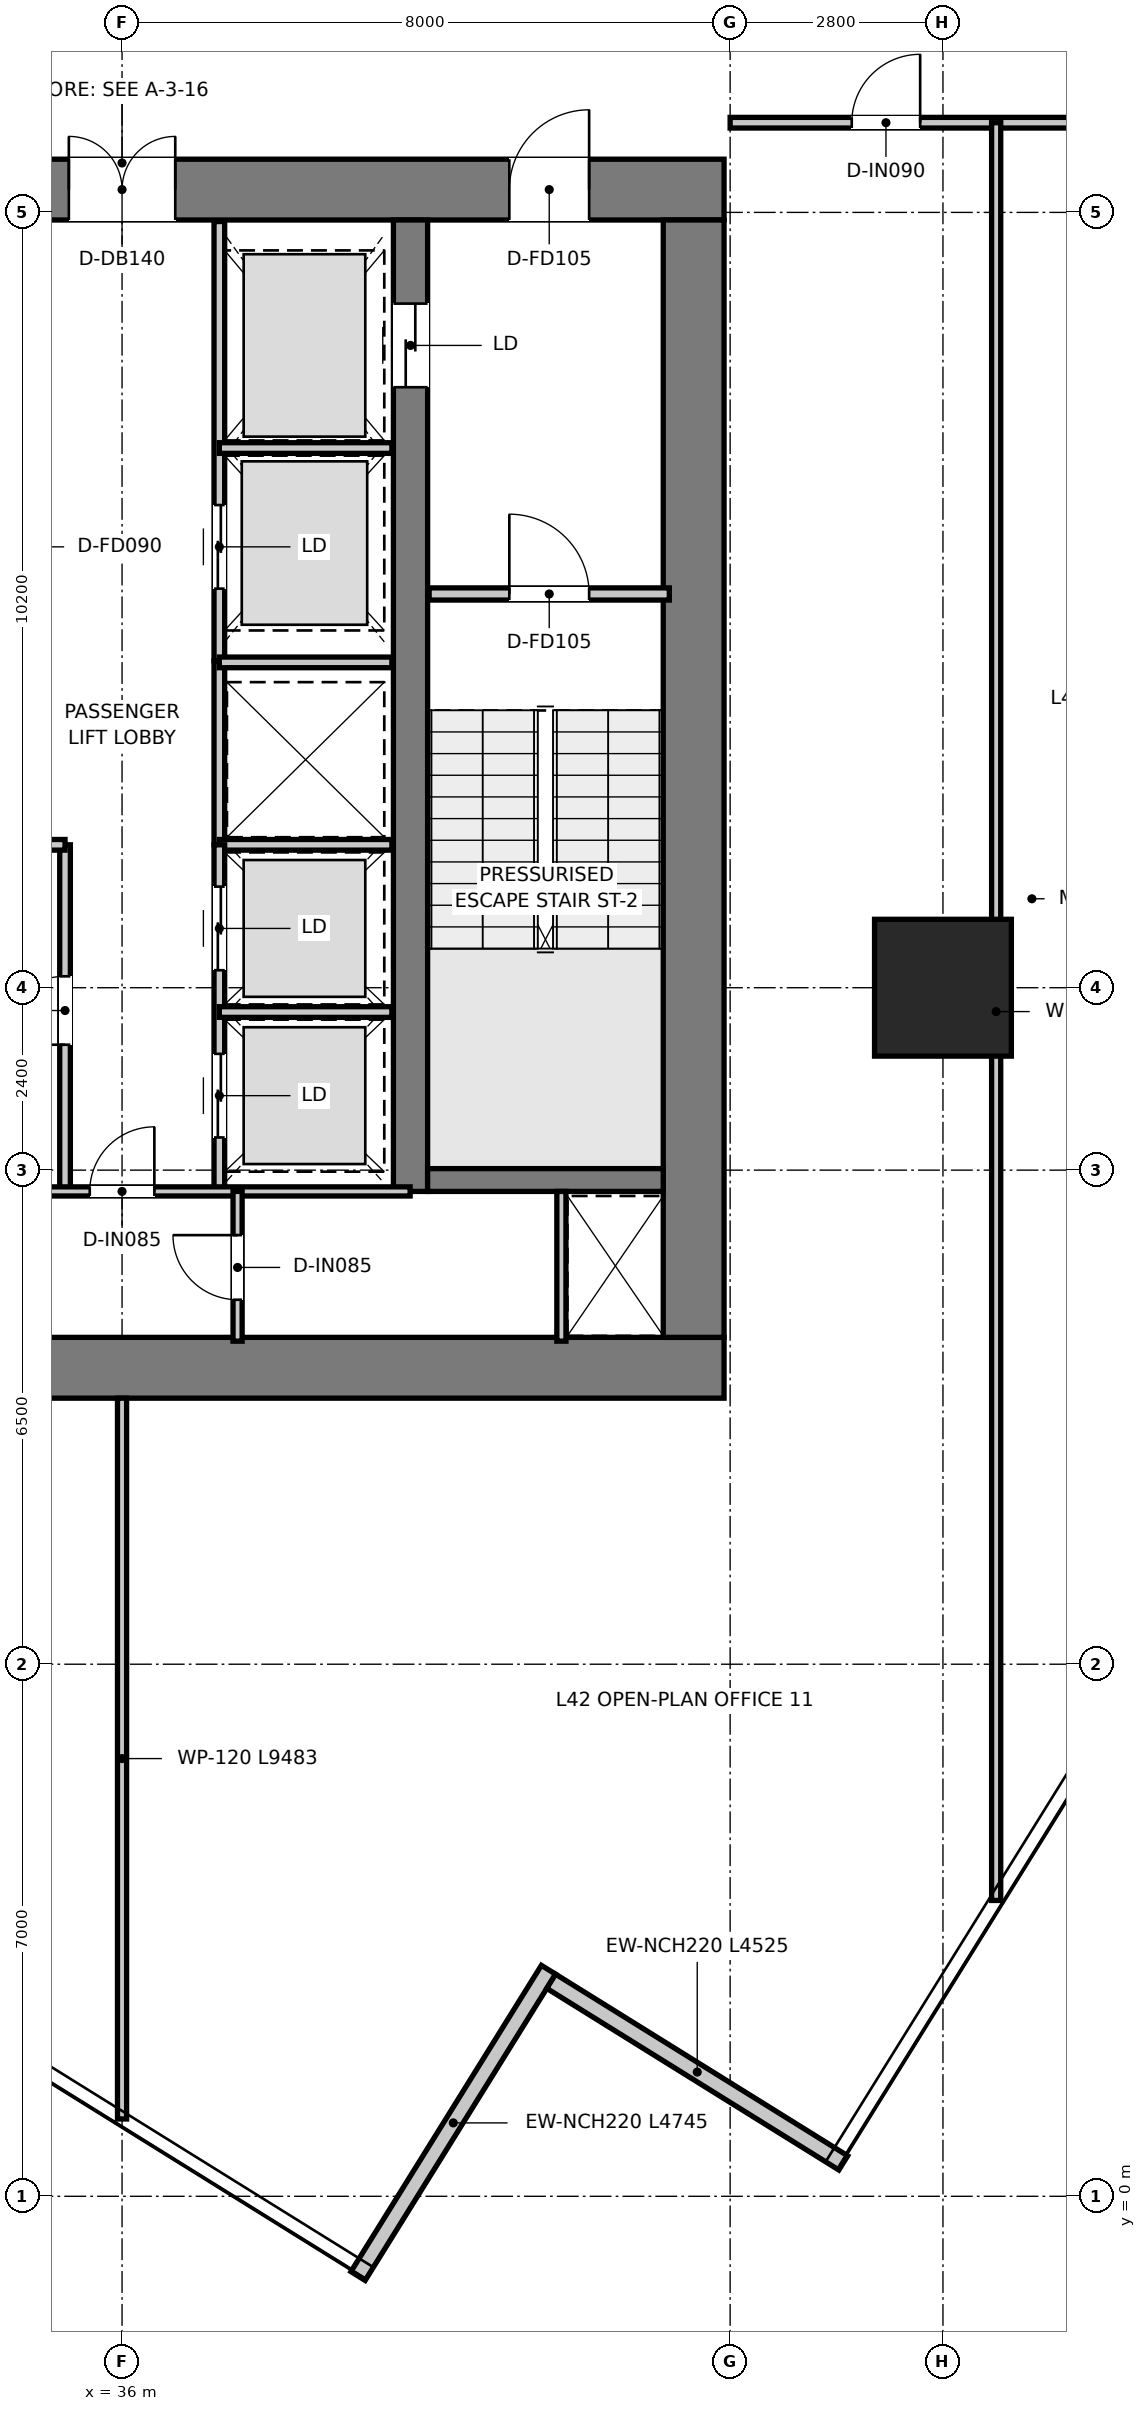
"""IFC4 building model, lengths in metres.
Left out: names, types, materials, properties, quantities, classifications, styles, units other than length and angle.
Written with IfcOpenShell. Run it as: python <this file> out.ifc"""

import sys

from ifc_helpers import new_model, si_unit, direction, frame, frame_2d, origin, origin_2d, place, context, subcontext, project, spatial, rectangle, extrude, source, transform, mapped, element, fill, save


model = new_model("IFC4")
c1 = context("Model", 3, precision=1e-05, world=origin(), true_north=direction((0.0, 1.0)))
c2 = subcontext(c1, "Body", "Model", "MODEL_VIEW")
j1 = project(units=[si_unit("LENGTHUNIT", "METRE"), si_unit("PLANEANGLEUNIT", "RADIAN")], contexts=[c1])
p1 = place(None, origin())
s1 = spatial("IfcSite", under=j1, at=p1, CompositionType="ELEMENT")
p2 = place(p1, origin())
s2 = spatial("IfcBuilding", under=s1, at=p2, CompositionType="ELEMENT")
p3 = place(p2, frame((0.0, 0.0, 173.85)))
s3 = spatial("IfcBuildingStorey", under=s2, at=p3, CompositionType="ELEMENT", Elevation=173.85)
p4 = place(p3, frame((28.08, 10.9, 0.0), z_axis=(0.0, 0.0, 1.0), x_axis=(1.0, 0.0, 0.0)))
e1 = element("IfcWall", 1, at=p4, inside=s3, PredefinedType="SHEAR", context=c2, shape_type="SweptSolid", body=[
    extrude(rectangle(XDim=15.84, YDim=0.8, at=frame_2d((7.92, 0.0))), origin(), (0.0, 0.0, 1.0), 3.95),
])
p5 = place(p3, frame((28.08, 26.4, 0.0), z_axis=(0.0, 0.0, 1.0), x_axis=(1.0, 0.0, 0.0)))
e2 = element("IfcWall", 2, at=p5, inside=s3, PredefinedType="SHEAR", context=c2, shape_type="SweptSolid", body=[
    extrude(rectangle(XDim=15.84, YDim=0.8, at=frame_2d((7.92, 0.0))), origin(), (0.0, 0.0, 1.0), 3.95),
])
p6 = place(p5, frame((7.22, 0.0, 0.0)))
e3 = element("IfcOpeningElement", 3, at=p6, cuts=e2, PredefinedType="OPENING", context=c2, shape_type="SweptSolid", body=[
    extrude(rectangle(XDim=1.4, YDim=2.2, at=frame_2d((0.7, 1.1))), frame((0.0, 0.41, 0.0), z_axis=(0.0, -1.0, 0.0), x_axis=(1.0, 0.0, 0.0)), (0.0, 0.0, 1.0), 0.82),
])
p7 = place(p5, frame((1.775, 0.0, 0.0)))
e4 = element("IfcOpeningElement", 4, at=p7, cuts=e2, PredefinedType="OPENING", context=c2, shape_type="SweptSolid", body=[
    extrude(rectangle(XDim=1.05, YDim=2.1, at=frame_2d((0.525, 1.05))), frame((0.0, 0.41, 0.0), z_axis=(0.0, -1.0, 0.0), x_axis=(1.0, 0.0, 0.0)), (0.0, 0.0, 1.0), 0.82),
])
p8 = place(p5, frame((13.015, 0.0, 0.0)))
e5 = element("IfcOpeningElement", 5, at=p8, cuts=e2, PredefinedType="OPENING", context=c2, shape_type="SweptSolid", body=[
    extrude(rectangle(XDim=1.05, YDim=2.1, at=frame_2d((0.525, 1.05))), frame((0.0, 0.41, 0.0), z_axis=(0.0, -1.0, 0.0), x_axis=(1.0, 0.0, 0.0)), (0.0, 0.0, 1.0), 0.82),
])
p9 = place(p3, frame((43.52, 11.3, 0.0), z_axis=(0.0, 0.0, 1.0), x_axis=(0.0, 1.0, 0.0)))
e6 = element("IfcWall", 6, at=p9, inside=s3, PredefinedType="SHEAR", context=c2, shape_type="SweptSolid", body=[
    extrude(rectangle(XDim=14.7, YDim=0.8, at=frame_2d((7.35, 0.0))), origin(), (0.0, 0.0, 1.0), 3.95),
])
p10 = place(p3, frame((39.795, 13.22, 0.0), z_axis=(0.0, 0.0, 1.0), x_axis=(0.0, 1.0, 0.0)))
e7 = element("IfcWall", 7, at=p10, inside=s3, PredefinedType="SHEAR", context=c2, shape_type="SweptSolid", body=[
    extrude(rectangle(XDim=12.78, YDim=0.45, at=frame_2d((6.39, 0.0))), origin(), (0.0, 0.0, 1.0), 3.95),
])
p11 = place(p10, frame((10.58, 0.0, 0.0)))
e8 = element("IfcOpeningElement", 8, at=p11, cuts=e7, PredefinedType="OPENING", context=c2, shape_type="SweptSolid", body=[
    extrude(rectangle(XDim=1.1, YDim=2.15, at=frame_2d((0.55, 1.075))), frame((0.0, 0.235, 0.0), z_axis=(0.0, -1.0, 0.0), x_axis=(1.0, 0.0, 0.0)), (0.0, 0.0, 1.0), 0.47),
])
p12 = place(p3, frame((40.02, 13.37, 0.0), z_axis=(0.0, 0.0, 1.0), x_axis=(1.0, 0.0, 0.0)))
e9 = element("IfcWall", 9, at=p12, inside=s3, PredefinedType="SHEAR", context=c2, shape_type="SweptSolid", body=[
    extrude(rectangle(XDim=3.1, YDim=0.3, at=frame_2d((1.55, 0.0))), origin(), (0.0, 0.0, 1.0), 3.95),
])
m1 = source(origin(), c2, "Body", "SweptSolid", [
    extrude(rectangle(XDim=1.8, YDim=1.8, at=origin_2d()), origin(), (0.0, 0.0, 1.0), 3.95),
])
p13 = place(p3, frame((46.8, 15.9, 0.0), z_axis=(0.0, 0.0, 1.0), x_axis=(1.0, 0.0, 0.0)))
e10 = element("IfcColumn", 10, at=p13, inside=s3, PredefinedType="USERDEFINED", context=c2, shape_type="MappedRepresentation", body=[
    mapped(m1, transform((0.0, 0.0, 0.0), x_axis=(1.0, 0.0, 0.0), y_axis=(0.0, 1.0, 0.0), z_axis=(0.0, 0.0, 1.0), scale=1.0)),
])
p14 = place(p3, frame((39.105, -1.049, 0.0), z_axis=(0.0, 0.0, 1.0), x_axis=(0.528087569346, 0.849189919336, 0.0)))
e11 = element("IfcWall", 11, at=p14, inside=s3, PredefinedType="ELEMENTEDWALL", context=c2, shape_type="SweptSolid", body=[
    extrude(rectangle(XDim=4.745, YDim=0.22, at=frame_2d((2.373, 0.0))), origin(), (0.0, 0.0, 1.0), 3.67),
])
p15 = place(p3, frame((41.646, 2.829, 0.0), z_axis=(0.0, 0.0, 1.0), x_axis=(0.849220592333, -0.528038242514, 0.0)))
e12 = element("IfcWall", 12, at=p15, inside=s3, PredefinedType="ELEMENTEDWALL", context=c2, shape_type="SweptSolid", body=[
    extrude(rectangle(XDim=4.525, YDim=0.22, at=frame_2d((2.263, 0.0))), origin(), (0.0, 0.0, 1.0), 3.67),
])
p16 = place(p3, frame((40.04, 21.08, 0.0), z_axis=(0.0, 0.0, 1.0), x_axis=(1.0, 0.0, 0.0)))
e13 = element("IfcWall", 13, at=p16, inside=s3, PredefinedType="PARTITIONING", context=c2, shape_type="SweptSolid", body=[
    extrude(rectangle(XDim=3.16, YDim=0.16, at=frame_2d((1.58, 0.0))), origin(), (0.0, 0.0, 1.0), 3.67),
])
p17 = place(p16, frame((1.055, 0.0, 0.0)))
e14 = element("IfcOpeningElement", 14, at=p17, cuts=e13, PredefinedType="OPENING", context=c2, shape_type="SweptSolid", body=[
    extrude(rectangle(XDim=1.05, YDim=2.1, at=frame_2d((0.525, 1.05))), frame((0.0, 0.09, 0.0), z_axis=(0.0, -1.0, 0.0), x_axis=(1.0, 0.0, 0.0)), (0.0, 0.0, 1.0), 0.18),
])
p18 = place(p3, frame((37.28, 20.2, 0.0), z_axis=(0.0, 0.0, 1.0), x_axis=(0.0, 1.0, 0.0)))
e15 = element("IfcWall", 15, at=p18, inside=s3, PredefinedType="PARTITIONING", context=c2, shape_type="SweptSolid", body=[
    extrude(rectangle(XDim=5.78, YDim=0.14, at=frame_2d((2.89, 0.0))), origin(), (0.0, 0.0, 1.0), 2.67),
])
p19 = place(p18, frame((0.95, 0.0, 0.0)))
e16 = element("IfcOpeningElement", 16, at=p19, cuts=e15, PredefinedType="OPENING", context=c2, shape_type="SweptSolid", body=[
    extrude(rectangle(XDim=1.1, YDim=2.15, at=frame_2d((0.55, 1.075))), frame((0.0, 0.08, 0.0), z_axis=(0.0, -1.0, 0.0), x_axis=(1.0, 0.0, 0.0)), (0.0, 0.0, 1.0), 0.16),
])
p20 = place(p3, frame((37.28, 23.0, 0.0), z_axis=(0.0, 0.0, 1.0), x_axis=(1.0, 0.0, 0.0)))
e17 = element("IfcWall", 17, at=p20, inside=s3, PredefinedType="PARTITIONING", context=c2, shape_type="SweptSolid", body=[
    extrude(rectangle(XDim=2.27, YDim=0.14, at=frame_2d((1.135, 0.0))), origin(), (0.0, 0.0, 1.0), 2.67),
])
p21 = place(p3, frame((37.28, 17.78, 0.0), z_axis=(0.0, 0.0, 1.0), x_axis=(0.0, 1.0, 0.0)))
e18 = element("IfcWall", 18, at=p21, inside=s3, PredefinedType="PARTITIONING", context=c2, shape_type="SweptSolid", body=[
    extrude(rectangle(XDim=2.42, YDim=0.14, at=frame_2d((1.21, 0.0))), origin(), (0.0, 0.0, 1.0), 3.67),
])
for number, where, z_axis, x_axis in (
    (19, (37.28, 17.78, 0.0), (0.0, 0.0, 1.0), (1.0, 0.0, 0.0)),
    (20, (37.28, 20.18, 0.0), (0.0, 0.0, 1.0), (1.0, 0.0, 0.0)),
):
    element("IfcWall", number, at=place(p3, frame(where, z_axis=z_axis, x_axis=x_axis)), inside=s3, PredefinedType="PARTITIONING", context=c2, shape_type="SweptSolid", body=[
        extrude(rectangle(XDim=2.27, YDim=0.14, at=frame_2d((1.135, 0.0))), origin(), (0.0, 0.0, 1.0), 3.67),
    ])
p22 = place(p3, frame((35.25, 13.22, 0.0), z_axis=(0.0, 0.0, 1.0), x_axis=(0.0, 1.0, 0.0)))
e21 = element("IfcWall", 21, at=p22, inside=s3, PredefinedType="PARTITIONING", context=c2, shape_type="SweptSolid", body=[
    extrude(rectangle(XDim=4.56, YDim=0.14, at=frame_2d((2.28, 0.0))), origin(), (0.0, 0.0, 1.0), 3.67),
])
p23 = place(p22, frame((1.93, 0.0, 0.0)))
e22 = element("IfcOpeningElement", 22, at=p23, cuts=e21, PredefinedType="OPENING", context=c2, shape_type="SweptSolid", body=[
    extrude(rectangle(XDim=0.9, YDim=2.1, at=frame_2d((0.45, 1.05))), frame((0.0, 0.08, 0.0), z_axis=(0.0, -1.0, 0.0), x_axis=(1.0, 0.0, 0.0)), (0.0, 0.0, 1.0), 0.16),
])
p24 = place(p3, frame((34.72, 17.78, 0.0), z_axis=(0.0, 0.0, 1.0), x_axis=(1.0, 0.0, 0.0)))
e23 = element("IfcWall", 23, at=p24, inside=s3, PredefinedType="PARTITIONING", context=c2, shape_type="SweptSolid", body=[
    extrude(rectangle(XDim=0.53, YDim=0.14, at=frame_2d((0.265, 0.0))), origin(), (0.0, 0.0, 1.0), 3.67),
])
p25 = place(p3, frame((37.28, 13.22, 0.0), z_axis=(0.0, 0.0, 1.0), x_axis=(0.0, 1.0, 0.0)))
e24 = element("IfcWall", 24, at=p25, inside=s3, PredefinedType="PARTITIONING", context=c2, shape_type="SweptSolid", body=[
    extrude(rectangle(XDim=4.56, YDim=0.14, at=frame_2d((2.28, 0.0))), origin(), (0.0, 0.0, 1.0), 3.67),
])
p26 = place(p25, frame((0.71, 0.0, 0.0)))
e25 = element("IfcOpeningElement", 25, at=p26, cuts=e24, PredefinedType="OPENING", context=c2, shape_type="SweptSolid", body=[
    extrude(rectangle(XDim=1.1, YDim=2.15, at=frame_2d((0.55, 1.075))), frame((0.0, 0.08, 0.0), z_axis=(0.0, -1.0, 0.0), x_axis=(1.0, 0.0, 0.0)), (0.0, 0.0, 1.0), 0.16),
])
p27 = place(p25, frame((2.91, 0.0, 0.0)))
e26 = element("IfcOpeningElement", 26, at=p27, cuts=e24, PredefinedType="OPENING", context=c2, shape_type="SweptSolid", body=[
    extrude(rectangle(XDim=1.1, YDim=2.15, at=frame_2d((0.55, 1.075))), frame((0.0, 0.08, 0.0), z_axis=(0.0, -1.0, 0.0), x_axis=(1.0, 0.0, 0.0)), (0.0, 0.0, 1.0), 0.16),
])
p28 = place(p3, frame((37.28, 15.58, 0.0), z_axis=(0.0, 0.0, 1.0), x_axis=(1.0, 0.0, 0.0)))
e27 = element("IfcWall", 27, at=p28, inside=s3, PredefinedType="PARTITIONING", context=c2, shape_type="SweptSolid", body=[
    extrude(rectangle(XDim=2.27, YDim=0.14, at=frame_2d((1.135, 0.0))), origin(), (0.0, 0.0, 1.0), 3.67),
])
p29 = place(p3, frame((41.78, 11.25, 0.0), z_axis=(0.0, 0.0, 1.0), x_axis=(0.0, 1.0, 0.0)))
e28 = element("IfcWall", 28, at=p29, inside=s3, PredefinedType="PARTITIONING", context=c2, shape_type="SweptSolid", body=[
    extrude(rectangle(XDim=1.97, YDim=0.12, at=frame_2d((0.985, 0.0))), origin(), (0.0, 0.0, 1.0), 3.67),
])
p30 = place(p3, frame((32.21, 13.22, 0.0), z_axis=(0.0, 0.0, 1.0), x_axis=(1.0, 0.0, 0.0)))
e29 = element("IfcWall", 29, at=p30, inside=s3, PredefinedType="PARTITIONING", context=c2, shape_type="SweptSolid", body=[
    extrude(rectangle(XDim=7.58, YDim=0.12, at=frame_2d((3.79, 0.0))), origin(), (0.0, 0.0, 1.0), 3.67),
])
p31 = place(p30, frame((3.365, 0.0, 0.0)))
e30 = element("IfcOpeningElement", 30, at=p31, cuts=e29, PredefinedType="OPENING", context=c2, shape_type="SweptSolid", body=[
    extrude(rectangle(XDim=0.85, YDim=2.1, at=frame_2d((0.425, 1.05))), frame((0.0, 0.07, 0.0), z_axis=(0.0, -1.0, 0.0), x_axis=(1.0, 0.0, 0.0)), (0.0, 0.0, 1.0), 0.14),
])
p32 = place(p3, frame((37.52, 11.25, 0.0), z_axis=(0.0, 0.0, 1.0), x_axis=(0.0, 1.0, 0.0)))
e31 = element("IfcWall", 31, at=p32, inside=s3, PredefinedType="PARTITIONING", context=c2, shape_type="SweptSolid", body=[
    extrude(rectangle(XDim=1.97, YDim=0.12, at=frame_2d((0.985, 0.0))), origin(), (0.0, 0.0, 1.0), 3.67),
])
p33 = place(p32, frame((0.545, 0.0, 0.0)))
e32 = element("IfcOpeningElement", 32, at=p33, cuts=e31, PredefinedType="OPENING", context=c2, shape_type="SweptSolid", body=[
    extrude(rectangle(XDim=0.85, YDim=2.1, at=frame_2d((0.425, 1.05))), frame((0.0, 0.07, 0.0), z_axis=(0.0, -1.0, 0.0), x_axis=(1.0, 0.0, 0.0)), (0.0, 0.0, 1.0), 0.14),
])
p34 = place(p3, frame((44.0, 27.28, 0.0), z_axis=(0.0, 0.0, 1.0), x_axis=(1.0, 0.0, 0.0)))
e33 = element("IfcWall", 33, at=p34, inside=s3, PredefinedType="PARTITIONING", context=c2, shape_type="SweptSolid", body=[
    extrude(rectangle(XDim=18.044, YDim=0.14, at=frame_2d((9.022, 0.0))), origin(), (0.0, 0.0, 1.0), 3.03),
])
p35 = place(p34, frame((1.6, 0.0, 0.0)))
e34 = element("IfcOpeningElement", 34, at=p35, cuts=e33, PredefinedType="OPENING", context=c2, shape_type="SweptSolid", body=[
    extrude(rectangle(XDim=0.9, YDim=2.1, at=frame_2d((0.45, 1.05))), frame((0.0, 0.08, 0.0), z_axis=(0.0, -1.0, 0.0), x_axis=(1.0, 0.0, 0.0)), (0.0, 0.0, 1.0), 0.16),
])
p36 = place(p34, frame((4.75, 0.0, 0.0)))
e35 = element("IfcOpeningElement", 35, at=p36, cuts=e33, PredefinedType="OPENING", context=c2, shape_type="SweptSolid", body=[
    extrude(rectangle(XDim=0.9, YDim=2.1, at=frame_2d((0.45, 1.05))), frame((0.0, 0.08, 0.0), z_axis=(0.0, -1.0, 0.0), x_axis=(1.0, 0.0, 0.0)), (0.0, 0.0, 1.0), 0.16),
])
p37 = place(p34, frame((13.191, 0.0, 0.0)))
e36 = element("IfcOpeningElement", 36, at=p37, cuts=e33, PredefinedType="OPENING", context=c2, shape_type="SweptSolid", body=[
    extrude(rectangle(XDim=0.9, YDim=2.1, at=frame_2d((0.45, 1.05))), frame((0.0, 0.08, 0.0), z_axis=(0.0, -1.0, 0.0), x_axis=(1.0, 0.0, 0.0)), (0.0, 0.0, 1.0), 0.16),
])
p38 = place(p3, frame((36.0, 1.017, 0.0), z_axis=(0.0, 0.0, 1.0), x_axis=(0.0, 1.0, 0.0)))
e37 = element("IfcWall", 37, at=p38, inside=s3, PredefinedType="PARTITIONING", context=c2, shape_type="SweptSolid", body=[
    extrude(rectangle(XDim=9.483, YDim=0.12, at=frame_2d((4.741, 0.0))), origin(), (0.0, 0.0, 1.0), 3.67),
])
p39 = place(p3, frame((47.5, 3.892, 0.0), z_axis=(0.0, 0.0, 1.0), x_axis=(0.0, 1.0, 0.0)))
e38 = element("IfcWall", 38, at=p39, inside=s3, PredefinedType="PARTITIONING", context=c2, shape_type="SweptSolid", body=[
    extrude(rectangle(XDim=23.388, YDim=0.12, at=frame_2d((11.694, 0.0))), origin(), (0.0, 0.0, 1.0), 3.08),
])
p40 = place(p17, origin())
e39 = element("IfcDoor", 39, at=p40, inside=s3, OperationType="SINGLE_SWING_LEFT", PredefinedType="DOOR", context=c2, shape_type="SweptSolid", body=[
    extrude(rectangle(XDim=1.05, YDim=2.1, at=frame_2d((0.525, 1.05))), frame((0.0, 0.025, 0.0), z_axis=(0.0, -1.0, 0.0), x_axis=(1.0, 0.0, 0.0)), (0.0, 0.0, 1.0), 0.05),
])
fill(e14, e39)
p41 = place(p6, origin())
e40 = element("IfcDoor", 40, at=p41, inside=s3, OperationType="DOUBLE_DOOR_SINGLE_SWING", PredefinedType="DOOR", context=c2, shape_type="SweptSolid", body=[
    extrude(rectangle(XDim=1.4, YDim=2.2, at=frame_2d((0.7, 1.1))), frame((0.0, 0.025, 0.0), z_axis=(0.0, -1.0, 0.0), x_axis=(1.0, 0.0, 0.0)), (0.0, 0.0, 1.0), 0.05),
])
fill(e3, e40)
p42 = place(p8, origin())
e41 = element("IfcDoor", 41, at=p42, inside=s3, OperationType="SINGLE_SWING_RIGHT", PredefinedType="DOOR", context=c2, shape_type="SweptSolid", body=[
    extrude(rectangle(XDim=1.05, YDim=2.1, at=frame_2d((0.525, 1.05))), frame((0.0, 0.025, 0.0), z_axis=(0.0, -1.0, 0.0), x_axis=(1.0, 0.0, 0.0)), (0.0, 0.0, 1.0), 0.05),
])
fill(e5, e41)
p43 = place(p11, origin())
e42 = element("IfcDoor", 42, at=p43, inside=s3, OperationType="DOUBLE_DOOR_SLIDING", PredefinedType="DOOR", context=c2, shape_type="SweptSolid", body=[
    extrude(rectangle(XDim=1.1, YDim=2.15, at=frame_2d((0.55, 1.075))), frame((0.0, 0.025, 0.0), z_axis=(0.0, -1.0, 0.0), x_axis=(1.0, 0.0, 0.0)), (0.0, 0.0, 1.0), 0.05),
])
fill(e8, e42)
p44 = place(p19, origin())
e43 = element("IfcDoor", 43, at=p44, inside=s3, OperationType="DOUBLE_DOOR_SLIDING", PredefinedType="DOOR", context=c2, shape_type="SweptSolid", body=[
    extrude(rectangle(XDim=1.1, YDim=2.15, at=frame_2d((0.55, 1.075))), frame((0.0, 0.025, 0.0), z_axis=(0.0, -1.0, 0.0), x_axis=(1.0, 0.0, 0.0)), (0.0, 0.0, 1.0), 0.05),
])
fill(e16, e43)
p45 = place(p23, origin())
e44 = element("IfcDoor", 44, at=p45, inside=s3, OperationType="SINGLE_SWING_LEFT", PredefinedType="DOOR", context=c2, shape_type="SweptSolid", body=[
    extrude(rectangle(XDim=0.9, YDim=2.1, at=frame_2d((0.45, 1.05))), frame((0.0, 0.025, 0.0), z_axis=(0.0, -1.0, 0.0), x_axis=(1.0, 0.0, 0.0)), (0.0, 0.0, 1.0), 0.05),
])
fill(e22, e44)
p46 = place(p26, origin())
e45 = element("IfcDoor", 45, at=p46, inside=s3, OperationType="DOUBLE_DOOR_SLIDING", PredefinedType="DOOR", context=c2, shape_type="SweptSolid", body=[
    extrude(rectangle(XDim=1.1, YDim=2.15, at=frame_2d((0.55, 1.075))), frame((0.0, 0.025, 0.0), z_axis=(0.0, -1.0, 0.0), x_axis=(1.0, 0.0, 0.0)), (0.0, 0.0, 1.0), 0.05),
])
fill(e25, e45)
p47 = place(p27, origin())
e46 = element("IfcDoor", 46, at=p47, inside=s3, OperationType="DOUBLE_DOOR_SLIDING", PredefinedType="DOOR", context=c2, shape_type="SweptSolid", body=[
    extrude(rectangle(XDim=1.1, YDim=2.15, at=frame_2d((0.55, 1.075))), frame((0.0, 0.025, 0.0), z_axis=(0.0, -1.0, 0.0), x_axis=(1.0, 0.0, 0.0)), (0.0, 0.0, 1.0), 0.05),
])
fill(e26, e46)
p48 = place(p31, origin())
e47 = element("IfcDoor", 47, at=p48, inside=s3, OperationType="SINGLE_SWING_RIGHT", PredefinedType="DOOR", context=c2, shape_type="SweptSolid", body=[
    extrude(rectangle(XDim=0.85, YDim=2.1, at=frame_2d((0.425, 1.05))), frame((0.0, 0.025, 0.0), z_axis=(0.0, -1.0, 0.0), x_axis=(1.0, 0.0, 0.0)), (0.0, 0.0, 1.0), 0.05),
])
fill(e30, e47)
p49 = place(p33, origin())
e48 = element("IfcDoor", 48, at=p49, inside=s3, OperationType="SINGLE_SWING_RIGHT", PredefinedType="DOOR", context=c2, shape_type="SweptSolid", body=[
    extrude(rectangle(XDim=0.85, YDim=2.1, at=frame_2d((0.425, 1.05))), frame((0.0, 0.025, 0.0), z_axis=(0.0, -1.0, 0.0), x_axis=(1.0, 0.0, 0.0)), (0.0, 0.0, 1.0), 0.05),
])
fill(e32, e48)
p50 = place(p35, origin())
e49 = element("IfcDoor", 49, at=p50, inside=s3, OperationType="SINGLE_SWING_RIGHT", PredefinedType="DOOR", context=c2, shape_type="SweptSolid", body=[
    extrude(rectangle(XDim=0.9, YDim=2.1, at=frame_2d((0.45, 1.05))), frame((0.0, 0.025, 0.0), z_axis=(0.0, -1.0, 0.0), x_axis=(1.0, 0.0, 0.0)), (0.0, 0.0, 1.0), 0.05),
])
fill(e34, e49)
save(model, sys.argv[1])
